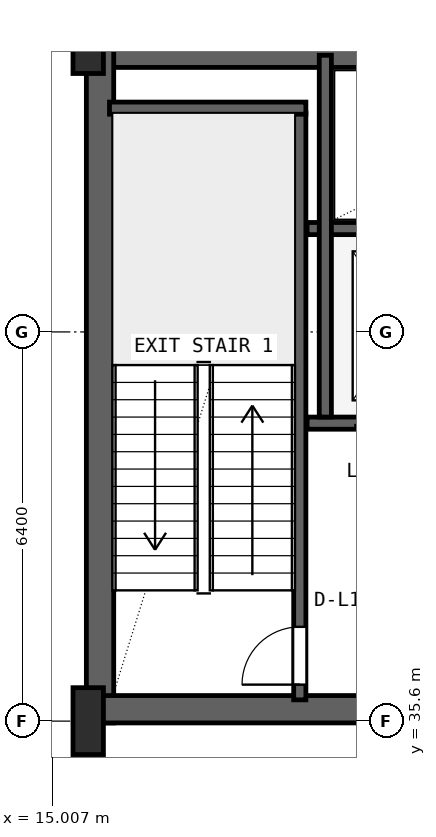
"""IFC4 building model, lengths in metres.
Left out: names, types, materials, properties, quantities, classifications, styles, units other than length and angle.
Written with IfcOpenShell. Run it as: python <this file> out.ifc"""

import sys

from ifc_helpers import new_model, si_unit, direction, frame, frame_2d, origin, origin_2d, place, context, subcontext, project, spatial, rectangle, i_section, extrude, source, transform, mapped, element, fill, save


model = new_model("IFC4")
c1 = context("Model", 3, precision=1e-05, world=origin(), true_north=direction((0.0, 1.0)))
c2 = subcontext(c1, "Body", "Model", "MODEL_VIEW")
j1 = project(units=[si_unit("LENGTHUNIT", "METRE"), si_unit("PLANEANGLEUNIT", "RADIAN")], contexts=[c1])
p1 = place(None, origin())
s1 = spatial("IfcSite", under=j1, at=p1, CompositionType="ELEMENT")
p2 = place(p1, origin())
s2 = spatial("IfcBuilding", under=s1, at=p2, CompositionType="ELEMENT")
p3 = place(p2, frame((0.0, 0.0, 82.2)))
s3 = spatial("IfcBuildingStorey", under=s2, at=p3, CompositionType="ELEMENT", Elevation=82.2)
p4 = place(p3, frame((15.6, 46.575, 0.0), z_axis=(0.0, 0.0, 1.0), x_axis=(1.0, 0.0, 0.0)))
e1 = element("IfcWall", 1, at=p4, inside=s3, PredefinedType="SHEAR", context=c2, shape_type="SweptSolid", body=[
    extrude(rectangle(XDim=36.8, YDim=0.45, at=frame_2d((18.4, 0.0))), origin(), (0.0, 0.0, 1.0), 4.55),
])
p5 = place(p3, frame((15.795, 35.57, 0.0), z_axis=(0.0, 0.0, 1.0), x_axis=(0.0, 1.0, 0.0)))
e2 = element("IfcWall", 2, at=p5, inside=s3, PredefinedType="SHEAR", context=c2, shape_type="SweptSolid", body=[
    extrude(rectangle(XDim=11.23, YDim=0.45, at=frame_2d((5.615, 0.0))), origin(), (0.0, 0.0, 1.0), 4.55),
])
p6 = place(p3, frame((15.57, 35.795, 0.0), z_axis=(0.0, 0.0, 1.0), x_axis=(1.0, 0.0, 0.0)))
e3 = element("IfcWall", 3, at=p6, inside=s3, PredefinedType="SHEAR", context=c2, shape_type="SweptSolid", body=[
    extrude(rectangle(XDim=9.23, YDim=0.45, at=frame_2d((4.615, 0.0))), origin(), (0.0, 0.0, 1.0), 4.55),
])
p7 = place(p6, frame((5.4, 0.0, 0.0)))
e4 = element("IfcOpeningElement", 4, at=p7, cuts=e3, PredefinedType="OPENING", context=c2, shape_type="SweptSolid", body=[
    extrude(rectangle(XDim=1.0, YDim=2.1, at=frame_2d((0.5, 1.05))), frame((0.0, 0.235, 0.0), z_axis=(0.0, -1.0, 0.0), x_axis=(1.0, 0.0, 0.0)), (0.0, 0.0, 1.0), 0.47),
])
m1 = source(origin(), c2, "Body", "SweptSolid", [
    extrude(i_section(OverallWidth=0.5, OverallDepth=1.1, WebThickness=0.018, FlangeThickness=0.032, FilletRadius=0.018, at=origin_2d()), origin(), (0.0, 0.0, 1.0), 4.8),
])
for number, where, z_axis, x_axis in (
    (5, (15.6, 35.6, 0.0), (0.0, 0.0, 1.0), (1.0, 0.0, 0.0)),
    (6, (15.6, 46.8, 0.0), (0.0, 0.0, 1.0), (1.0, 0.0, 0.0)),
):
    element("IfcColumn", number, at=place(p3, frame(where, z_axis=z_axis, x_axis=x_axis)), inside=s3, PredefinedType="COLUMN", context=c2, shape_type="MappedRepresentation", body=[
        mapped(m1, transform((0.0, 0.0, 0.0), x_axis=(1.0, 0.0, 0.0), y_axis=(0.0, 1.0, 0.0), z_axis=(0.0, 0.0, 1.0), scale=1.0)),
    ])
p8 = place(p3, frame((19.08, 35.95, 0.0), z_axis=(0.0, 0.0, 1.0), x_axis=(0.0, 1.0, 0.0)))
e7 = element("IfcWall", 7, at=p8, inside=s3, PredefinedType="SHEAR", context=c2, shape_type="SweptSolid", body=[
    extrude(rectangle(XDim=9.65, YDim=0.2, at=frame_2d((4.825, 0.0))), origin(), (0.0, 0.0, 1.0), 4.55),
])
p9 = place(p8, frame((0.25, 0.0, 0.0)))
e8 = element("IfcOpeningElement", 8, at=p9, cuts=e7, PredefinedType="OPENING", context=c2, shape_type="SweptSolid", body=[
    extrude(rectangle(XDim=0.95, YDim=2.1, at=frame_2d((0.475, 1.05))), frame((0.0, 0.11, 0.0), z_axis=(0.0, -1.0, 0.0), x_axis=(1.0, 0.0, 0.0)), (0.0, 0.0, 1.0), 0.22),
])
p10 = place(p3, frame((15.95, 45.68, 0.0), z_axis=(0.0, 0.0, 1.0), x_axis=(1.0, 0.0, 0.0)))
e9 = element("IfcWall", 9, at=p10, inside=s3, PredefinedType="SHEAR", context=c2, shape_type="SweptSolid", body=[
    extrude(rectangle(XDim=3.23, YDim=0.2, at=frame_2d((1.615, 0.0))), origin(), (0.0, 0.0, 1.0), 4.55),
])
p11 = place(p3, frame((19.2, 40.5, 0.0), z_axis=(0.0, 0.0, 1.0), x_axis=(1.0, 0.0, 0.0)))
e10 = element("IfcWall", 10, at=p11, inside=s3, PredefinedType="SHEAR", context=c2, shape_type="SweptSolid", body=[
    extrude(rectangle(XDim=5.52, YDim=0.2, at=frame_2d((2.76, 0.0))), origin(), (0.0, 0.0, 1.0), 4.55),
])
p12 = place(p11, frame((1.05, 0.0, 0.0)))
e11 = element("IfcOpeningElement", 11, at=p12, cuts=e10, PredefinedType="OPENING", context=c2, shape_type="SweptSolid", body=[
    extrude(rectangle(XDim=1.1, YDim=2.18, at=frame_2d((0.55, 1.09))), frame((0.0, 0.11, 0.0), z_axis=(0.0, -1.0, 0.0), x_axis=(1.0, 0.0, 0.0)), (0.0, 0.0, 1.0), 0.22),
])
p13 = place(p11, frame((3.65, 0.0, 0.0)))
e12 = element("IfcOpeningElement", 12, at=p13, cuts=e10, PredefinedType="OPENING", context=c2, shape_type="SweptSolid", body=[
    extrude(rectangle(XDim=1.1, YDim=2.18, at=frame_2d((0.55, 1.09))), frame((0.0, 0.11, 0.0), z_axis=(0.0, -1.0, 0.0), x_axis=(1.0, 0.0, 0.0)), (0.0, 0.0, 1.0), 0.22),
])
p14 = place(p3, frame((19.2, 43.7, 0.0), z_axis=(0.0, 0.0, 1.0), x_axis=(1.0, 0.0, 0.0)))
e13 = element("IfcWall", 13, at=p14, inside=s3, PredefinedType="SHEAR", context=c2, shape_type="SweptSolid", body=[
    extrude(rectangle(XDim=5.52, YDim=0.2, at=frame_2d((2.76, 0.0))), origin(), (0.0, 0.0, 1.0), 4.55),
])
p15 = place(p3, frame((19.5, 40.6, 0.0), z_axis=(0.0, 0.0, 1.0), x_axis=(0.0, 1.0, 0.0)))
e14 = element("IfcWall", 14, at=p15, inside=s3, PredefinedType="SHEAR", context=c2, shape_type="SweptSolid", body=[
    extrude(rectangle(XDim=5.95, YDim=0.2, at=frame_2d((2.975, 0.0))), origin(), (0.0, 0.0, 1.0), 4.55),
])
m2 = source(origin(), c2, "Body", "SweptSolid", [
    extrude(rectangle(XDim=0.95, YDim=2.1, at=frame_2d((0.475, 1.05))), frame((0.0, 0.025, 0.0), z_axis=(0.0, -1.0, 0.0), x_axis=(1.0, 0.0, 0.0)), (0.0, 0.0, 1.0), 0.05),
])
p16 = place(p9, origin())
e15 = element("IfcDoor", 15, at=p16, inside=s3, OperationType="SINGLE_SWING_LEFT", PredefinedType="DOOR", context=c2, shape_type="MappedRepresentation", body=[
    mapped(m2, transform((0.0, 0.0, 0.0), x_axis=(1.0, 0.0, 0.0), y_axis=(0.0, 1.0, 0.0), z_axis=(0.0, 0.0, 1.0), scale=1.0)),
])
fill(e8, e15)
save(model, sys.argv[1])
